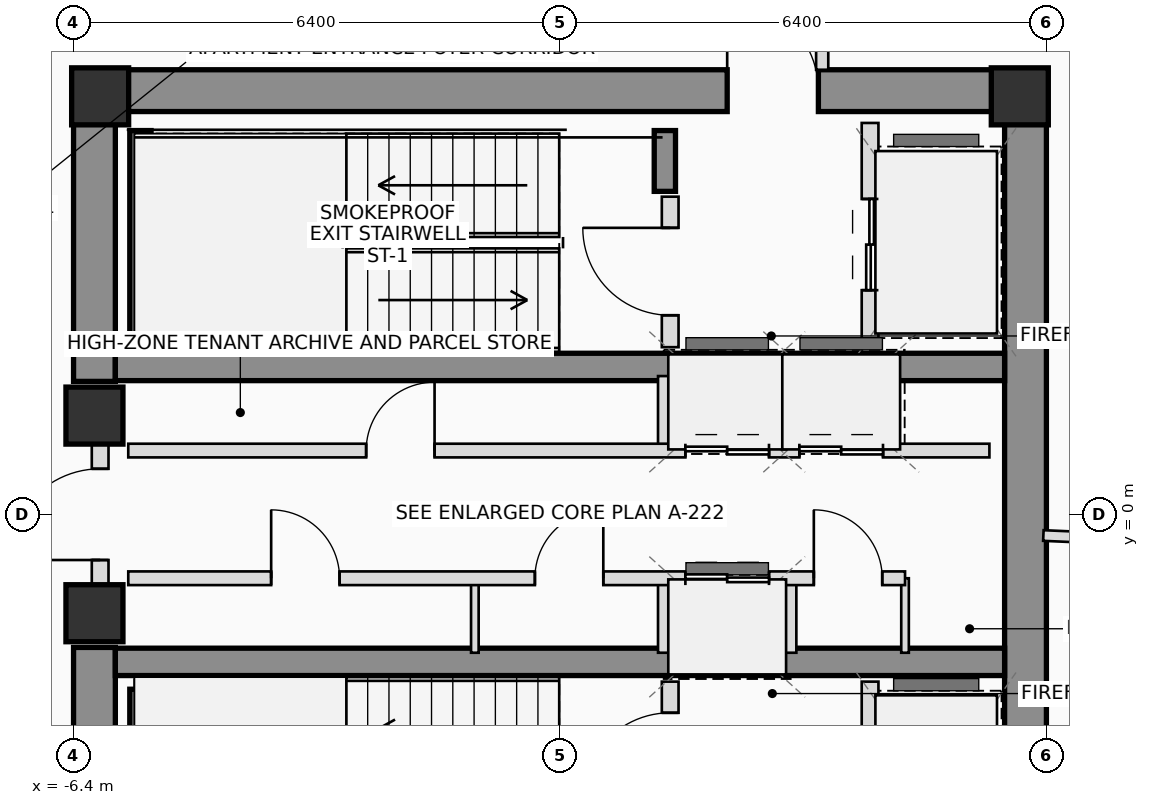
"""IFC4 building model, lengths in metres.
Left out: names, types, materials, properties, quantities, classifications, styles, units other than length and angle.
Written with IfcOpenShell. Run it as: python <this file> out.ifc"""

import sys

from ifc_helpers import new_model, si_unit, direction, frame, frame_2d, origin, origin_2d, place, context, subcontext, project, spatial, rectangle, extrude, source, transform, mapped, element, fill, save


model = new_model("IFC4")
c1 = context("Model", 3, precision=1e-05, world=origin(), true_north=direction((0.0, 1.0)))
c2 = subcontext(c1, "Body", "Model", "MODEL_VIEW")
j1 = project(units=[si_unit("LENGTHUNIT", "METRE"), si_unit("PLANEANGLEUNIT", "RADIAN")], contexts=[c1])
p1 = place(None, origin())
s1 = spatial("IfcSite", under=j1, at=p1, CompositionType="ELEMENT")
p2 = place(p1, origin())
s2 = spatial("IfcBuilding", under=s1, at=p2, CompositionType="ELEMENT")
p3 = place(p2, frame((0.0, 0.0, 228.65)))
s3 = spatial("IfcBuildingStorey", under=s2, at=p3, CompositionType="ELEMENT", Elevation=228.65)
m1 = source(origin(), c2, "Body", "SweptSolid", [
    extrude(rectangle(XDim=0.75, YDim=0.75, at=origin_2d()), origin(), (0.0, 0.0, 1.0), 3.4),
])
for number, where, z_axis, x_axis in (
    (1, (6.05, 5.5, 0.0), (0.0, 0.0, 1.0), (1.0, 0.0, 0.0)),
    (2, (-6.05, 5.5, 0.0), (0.0, 0.0, 1.0), (1.0, 0.0, 0.0)),
):
    element("IfcColumn", number, at=place(p3, frame(where, z_axis=z_axis, x_axis=x_axis)), inside=s3, PredefinedType="COLUMN", context=c2, shape_type="MappedRepresentation", body=[
        mapped(m1, transform((0.0, 0.0, 0.0), scale=1.0)),
    ])
p4 = place(p3, frame((-6.4, 5.575, 0.0), z_axis=(0.0, 0.0, 1.0), x_axis=(1.0, 0.0, 0.0)))
e3 = element("IfcWall", 3, at=p4, inside=s3, PredefinedType="SHEAR", context=c2, shape_type="SweptSolid", body=[
    extrude(rectangle(XDim=12.8, YDim=0.55, at=frame_2d((6.4, 0.0))), origin(), (0.0, 0.0, 1.0), 3.4),
])
p5 = place(p4, frame((8.6, 0.0, 0.0)))
e4 = element("IfcOpeningElement", 4, at=p5, cuts=e3, PredefinedType="OPENING", context=c2, shape_type="SweptSolid", body=[
    extrude(rectangle(XDim=1.2, YDim=2.2, at=frame_2d((0.6, 1.1))), frame((0.0, 0.285, 0.0), z_axis=(0.0, -1.0, 0.0), x_axis=(1.0, 0.0, 0.0)), (0.0, 0.0, 1.0), 0.57),
])
p6 = place(p3, frame((6.125, -5.3, 0.0), z_axis=(0.0, 0.0, 1.0), x_axis=(0.0, 1.0, 0.0)))
e5 = element("IfcWall", 5, at=p6, inside=s3, PredefinedType="SHEAR", context=c2, shape_type="SweptSolid", body=[
    extrude(rectangle(XDim=10.6, YDim=0.55, at=frame_2d((5.3, 0.0))), origin(), (0.0, 0.0, 1.0), 3.4),
])
for number, where, z_axis, x_axis in (
    (6, (-6.125, -5.3, 0.0), (0.0, 0.0, 1.0), (0.0, 1.0, 0.0)),
    (7, (-6.125, 1.75, 0.0), (0.0, 0.0, 1.0), (0.0, 1.0, 0.0)),
):
    element("IfcWall", number, at=place(p3, frame(where, z_axis=z_axis, x_axis=x_axis)), inside=s3, PredefinedType="SHEAR", context=c2, shape_type="SweptSolid", body=[
        extrude(rectangle(XDim=3.55, YDim=0.55, at=frame_2d((1.775, 0.0))), origin(), (0.0, 0.0, 1.0), 3.4),
    ])
for number, where, z_axis, x_axis in (
    (8, (-5.85, 1.94, 0.0), (0.0, 0.0, 1.0), (1.0, 0.0, 0.0)),
    (9, (-5.85, -1.94, 0.0), (0.0, 0.0, 1.0), (1.0, 0.0, 0.0)),
):
    element("IfcWall", number, at=place(p3, frame(where, z_axis=z_axis, x_axis=x_axis)), inside=s3, PredefinedType="SHEAR", context=c2, shape_type="SweptSolid", body=[
        extrude(rectangle(XDim=11.7, YDim=0.36, at=frame_2d((5.85, 0.0))), origin(), (0.0, 0.0, 1.0), 3.4),
    ])
p7 = place(p3, frame((-5.52, 2.3, 0.0), z_axis=(0.0, 0.0, 1.0), x_axis=(0.0, 1.0, 0.0)))
e10 = element("IfcWall", 10, at=p7, inside=s3, PredefinedType="SHEAR", context=c2, shape_type="SweptSolid", body=[
    extrude(rectangle(XDim=2.75, YDim=0.28, at=frame_2d((1.375, 0.0))), origin(), (0.0, 0.0, 1.0), 3.4),
])
p8 = place(p3, frame((1.38, 4.25, 0.0), z_axis=(0.0, 0.0, 1.0), x_axis=(0.0, 1.0, 0.0)))
e11 = element("IfcWall", 11, at=p8, inside=s3, PredefinedType="SHEAR", context=c2, shape_type="SweptSolid", body=[
    extrude(rectangle(XDim=0.8, YDim=0.28, at=frame_2d((0.4, 0.0))), origin(), (0.0, 0.0, 1.0), 3.4),
])
p9 = place(p3, frame((-5.52, -5.05, 0.0), z_axis=(0.0, 0.0, 1.0), x_axis=(0.0, 1.0, 0.0)))
e12 = element("IfcWall", 12, at=p9, inside=s3, PredefinedType="SHEAR", context=c2, shape_type="SweptSolid", body=[
    extrude(rectangle(XDim=2.75, YDim=0.28, at=frame_2d((1.375, 0.0))), origin(), (0.0, 0.0, 1.0), 3.4),
])
for number, where, z_axis, x_axis in (
    (13, (-6.125, -1.3, 0.0), (0.0, 0.0, 1.0), (1.0, 0.0, 0.0)),
    (14, (-6.125, 1.3, 0.0), (0.0, 0.0, 1.0), (1.0, 0.0, 0.0)),
):
    element("IfcColumn", number, at=place(p3, frame(where, z_axis=z_axis, x_axis=x_axis)), inside=s3, PredefinedType="COLUMN", context=c2, shape_type="MappedRepresentation", body=[
        mapped(m1, transform((0.0, 0.0, 0.0), scale=1.0)),
    ])
p10 = place(p3, frame((-6.05, -0.95, 0.0), z_axis=(0.0, 0.0, 1.0), x_axis=(0.0, 1.0, 0.0)))
e15 = element("IfcWall", 15, at=p10, inside=s3, PredefinedType="PLUMBINGWALL", context=c2, shape_type="SweptSolid", body=[
    extrude(rectangle(XDim=1.9, YDim=0.22, at=frame_2d((0.95, 0.0))), origin(), (0.0, 0.0, 1.0), 2.18),
])
p11 = place(p10, frame((0.35, 0.0, 0.0)))
e16 = element("IfcOpeningElement", 16, at=p11, cuts=e15, PredefinedType="OPENING", context=c2, shape_type="SweptSolid", body=[
    extrude(rectangle(XDim=1.2, YDim=2.2, at=frame_2d((0.6, 1.1))), frame((0.0, 0.12, 0.0), z_axis=(0.0, -1.0, 0.0), x_axis=(1.0, 0.0, 0.0)), (0.0, 0.0, 1.0), 0.24),
])
p12 = place(p3, frame((1.45, 2.2, 0.0), z_axis=(0.0, 0.0, 1.0), x_axis=(0.0, 1.0, 0.0)))
e17 = element("IfcWall", 17, at=p12, inside=s3, PredefinedType="PLUMBINGWALL", context=c2, shape_type="SweptSolid", body=[
    extrude(rectangle(XDim=1.98, YDim=0.22, at=frame_2d((0.99, 0.0))), origin(), (0.0, 0.0, 1.0), 3.2),
])
p13 = place(p12, frame((0.42, 0.0, 0.0)))
e18 = element("IfcOpeningElement", 18, at=p13, cuts=e17, PredefinedType="OPENING", context=c2, shape_type="SweptSolid", body=[
    extrude(rectangle(XDim=1.15, YDim=2.15, at=frame_2d((0.575, 1.075))), frame((0.0, 0.12, 0.0), z_axis=(0.0, -1.0, 0.0), x_axis=(1.0, 0.0, 0.0)), (0.0, 0.0, 1.0), 0.24),
])
p14 = place(p3, frame((4.08, 2.2, 0.0), z_axis=(0.0, 0.0, 1.0), x_axis=(0.0, 1.0, 0.0)))
e19 = element("IfcWall", 19, at=p14, inside=s3, PredefinedType="PLUMBINGWALL", context=c2, shape_type="SweptSolid", body=[
    extrude(rectangle(XDim=2.95, YDim=0.22, at=frame_2d((1.475, 0.0))), origin(), (0.0, 0.0, 1.0), 3.2),
])
p15 = place(p14, frame((0.75, 0.0, 0.0)))
e20 = element("IfcOpeningElement", 20, at=p15, cuts=e19, PredefinedType="OPENING", context=c2, shape_type="SweptSolid", body=[
    extrude(rectangle(XDim=1.2, YDim=2.25, at=frame_2d((0.6, 1.125))), frame((0.0, 0.12, 0.0), z_axis=(0.0, -1.0, 0.0), x_axis=(1.0, 0.0, 0.0)), (0.0, 0.0, 1.0), 0.24),
])
p16 = place(p3, frame((1.45, -4.18, 0.0), z_axis=(0.0, 0.0, 1.0), x_axis=(0.0, 1.0, 0.0)))
e21 = element("IfcWall", 21, at=p16, inside=s3, PredefinedType="PLUMBINGWALL", context=c2, shape_type="SweptSolid", body=[
    extrude(rectangle(XDim=1.98, YDim=0.22, at=frame_2d((0.99, 0.0))), origin(), (0.0, 0.0, 1.0), 3.2),
])
p17 = place(p16, frame((0.42, 0.0, 0.0)))
e22 = element("IfcOpeningElement", 22, at=p17, cuts=e21, PredefinedType="OPENING", context=c2, shape_type="SweptSolid", body=[
    extrude(rectangle(XDim=1.15, YDim=2.15, at=frame_2d((0.575, 1.075))), frame((0.0, 0.12, 0.0), z_axis=(0.0, -1.0, 0.0), x_axis=(1.0, 0.0, 0.0)), (0.0, 0.0, 1.0), 0.24),
])
p18 = place(p3, frame((4.08, -5.15, 0.0), z_axis=(0.0, 0.0, 1.0), x_axis=(0.0, 1.0, 0.0)))
e23 = element("IfcWall", 23, at=p18, inside=s3, PredefinedType="PLUMBINGWALL", context=c2, shape_type="SweptSolid", body=[
    extrude(rectangle(XDim=2.95, YDim=0.22, at=frame_2d((1.475, 0.0))), origin(), (0.0, 0.0, 1.0), 3.2),
])
p19 = place(p18, frame((0.95, 0.0, 0.0)))
e24 = element("IfcOpeningElement", 24, at=p19, cuts=e23, PredefinedType="OPENING", context=c2, shape_type="SweptSolid", body=[
    extrude(rectangle(XDim=1.2, YDim=2.25, at=frame_2d((0.6, 1.125))), frame((0.0, 0.12, 0.0), z_axis=(0.0, -1.0, 0.0), x_axis=(1.0, 0.0, 0.0)), (0.0, 0.0, 1.0), 0.24),
])
p20 = place(p3, frame((-1.12, -1.82, 0.0), z_axis=(0.0, 0.0, 1.0), x_axis=(0.0, 1.0, 0.0)))
e25 = element("IfcWall", 25, at=p20, inside=s3, PredefinedType="PARTITIONING", context=c2, shape_type="SweptSolid", body=[
    extrude(rectangle(XDim=0.98, YDim=0.1, at=frame_2d((0.49, 0.0))), origin(), (0.0, 0.0, 1.0), 3.2),
])
for number, where, z_axis, x_axis in (
    (26, (1.38, 0.84, 0.0), (0.0, 0.0, 1.0), (0.0, 1.0, 0.0)),
    (27, (1.38, -1.82, 0.0), (0.0, 0.0, 1.0), (0.0, 1.0, 0.0)),
    (28, (3.02, 0.84, 0.0), (0.0, 0.0, 1.0), (0.0, 1.0, 0.0)),
    (29, (4.38, 0.84, 0.0), (0.0, 0.0, 1.0), (0.0, 1.0, 0.0)),
    (30, (3.02, -1.82, 0.0), (0.0, 0.0, 1.0), (0.0, 1.0, 0.0)),
):
    element("IfcWall", number, at=place(p3, frame(where, z_axis=z_axis, x_axis=x_axis)), inside=s3, PredefinedType="PLUMBINGWALL", context=c2, shape_type="SweptSolid", body=[
        extrude(rectangle(XDim=0.98, YDim=0.18, at=frame_2d((0.49, 0.0))), origin(), (0.0, 0.0, 1.0), 3.2),
    ])
p21 = place(p3, frame((4.54, -1.82, 0.0), z_axis=(0.0, 0.0, 1.0), x_axis=(0.0, 1.0, 0.0)))
e31 = element("IfcWall", 31, at=p21, inside=s3, PredefinedType="PARTITIONING", context=c2, shape_type="SweptSolid", body=[
    extrude(rectangle(XDim=0.98, YDim=0.1, at=frame_2d((0.49, 0.0))), origin(), (0.0, 0.0, 1.0), 3.2),
])
p22 = place(p3, frame((-5.68, 0.84, 0.0), z_axis=(0.0, 0.0, 1.0), x_axis=(1.0, 0.0, 0.0)))
e32 = element("IfcWall", 32, at=p22, inside=s3, PredefinedType="PLUMBINGWALL", context=c2, shape_type="SweptSolid", body=[
    extrude(rectangle(XDim=11.33, YDim=0.18, at=frame_2d((5.665, 0.0))), origin(), (0.0, 0.0, 1.0), 3.2),
])
p23 = place(p22, frame((3.13, 0.0, 0.0)))
e33 = element("IfcOpeningElement", 33, at=p23, cuts=e32, PredefinedType="OPENING", context=c2, shape_type="SweptSolid", body=[
    extrude(rectangle(XDim=0.9, YDim=2.05, at=frame_2d((0.45, 1.025))), frame((0.0, 0.1, 0.0), z_axis=(0.0, -1.0, 0.0), x_axis=(1.0, 0.0, 0.0)), (0.0, 0.0, 1.0), 0.2),
])
p24 = place(p22, frame((7.33, 0.0, 0.0)))
e34 = element("IfcOpeningElement", 34, at=p24, cuts=e32, PredefinedType="OPENING", context=c2, shape_type="SweptSolid", body=[
    extrude(rectangle(XDim=1.1, YDim=2.2, at=frame_2d((0.55, 1.1))), frame((0.0, 0.1, 0.0), z_axis=(0.0, -1.0, 0.0), x_axis=(1.0, 0.0, 0.0)), (0.0, 0.0, 1.0), 0.2),
])
p25 = place(p22, frame((8.83, 0.0, 0.0)))
e35 = element("IfcOpeningElement", 35, at=p25, cuts=e32, PredefinedType="OPENING", context=c2, shape_type="SweptSolid", body=[
    extrude(rectangle(XDim=1.1, YDim=2.2, at=frame_2d((0.55, 1.1))), frame((0.0, 0.1, 0.0), z_axis=(0.0, -1.0, 0.0), x_axis=(1.0, 0.0, 0.0)), (0.0, 0.0, 1.0), 0.2),
])
p26 = place(p3, frame((-5.68, -0.84, 0.0), z_axis=(0.0, 0.0, 1.0), x_axis=(1.0, 0.0, 0.0)))
e36 = element("IfcWall", 36, at=p26, inside=s3, PredefinedType="PLUMBINGWALL", context=c2, shape_type="SweptSolid", body=[
    extrude(rectangle(XDim=10.22, YDim=0.18, at=frame_2d((5.11, 0.0))), origin(), (0.0, 0.0, 1.0), 3.2),
])
p27 = place(p26, frame((1.88, 0.0, 0.0)))
e37 = element("IfcOpeningElement", 37, at=p27, cuts=e36, PredefinedType="OPENING", context=c2, shape_type="SweptSolid", body=[
    extrude(rectangle(XDim=0.9, YDim=2.05, at=frame_2d((0.45, 1.025))), frame((0.0, 0.1, 0.0), z_axis=(0.0, -1.0, 0.0), x_axis=(1.0, 0.0, 0.0)), (0.0, 0.0, 1.0), 0.2),
])
p28 = place(p26, frame((5.35, 0.0, 0.0)))
e38 = element("IfcOpeningElement", 38, at=p28, cuts=e36, PredefinedType="OPENING", context=c2, shape_type="SweptSolid", body=[
    extrude(rectangle(XDim=0.9, YDim=2.05, at=frame_2d((0.45, 1.025))), frame((0.0, 0.1, 0.0), z_axis=(0.0, -1.0, 0.0), x_axis=(1.0, 0.0, 0.0)), (0.0, 0.0, 1.0), 0.2),
])
p29 = place(p26, frame((7.33, 0.0, 0.0)))
e39 = element("IfcOpeningElement", 39, at=p29, cuts=e36, PredefinedType="OPENING", context=c2, shape_type="SweptSolid", body=[
    extrude(rectangle(XDim=1.1, YDim=2.2, at=frame_2d((0.55, 1.1))), frame((0.0, 0.1, 0.0), z_axis=(0.0, -1.0, 0.0), x_axis=(1.0, 0.0, 0.0)), (0.0, 0.0, 1.0), 0.2),
])
p30 = place(p26, frame((9.02, 0.0, 0.0)))
e40 = element("IfcOpeningElement", 40, at=p30, cuts=e36, PredefinedType="OPENING", context=c2, shape_type="SweptSolid", body=[
    extrude(rectangle(XDim=0.9, YDim=2.05, at=frame_2d((0.45, 1.025))), frame((0.0, 0.1, 0.0), z_axis=(0.0, -1.0, 0.0), x_axis=(1.0, 0.0, 0.0)), (0.0, 0.0, 1.0), 0.2),
])
p31 = place(p3, frame((3.45, 7.49, 0.0), z_axis=(0.0, 0.0, 1.0), x_axis=(0.0, -1.0, 0.0)))
e41 = element("IfcWall", 41, at=p31, inside=s3, PredefinedType="PARTITIONING", context=c2, shape_type="SweptSolid", body=[
    extrude(rectangle(XDim=1.64, YDim=0.16, at=frame_2d((0.82, 0.0))), origin(), (0.0, 0.0, 1.0), 3.2),
])
p32 = place(p31, frame((0.32, 0.0, 0.0)))
e42 = element("IfcOpeningElement", 42, at=p32, cuts=e41, PredefinedType="OPENING", context=c2, shape_type="SweptSolid", body=[
    extrude(rectangle(XDim=1.0, YDim=2.25, at=frame_2d((0.5, 1.125))), frame((0.0, 0.09, 0.0), z_axis=(0.0, -1.0, 0.0), x_axis=(1.0, 0.0, 0.0)), (0.0, 0.0, 1.0), 0.18),
])
p33 = place(p3, frame((6.36, -0.278, 0.0), z_axis=(0.0, 0.0, 1.0), x_axis=(0.99904773846, -0.043630451279, 0.0)))
e43 = element("IfcWall", 43, at=p33, inside=s3, PredefinedType="PARTITIONING", context=c2, shape_type="SweptSolid", body=[
    extrude(rectangle(XDim=8.992, YDim=0.14, at=frame_2d((4.496, 0.0))), origin(), (0.0, 0.0, 1.0), 2.605),
])
p34 = place(p5, origin())
e44 = element("IfcDoor", 44, at=p34, inside=s3, OperationType="SINGLE_SWING_LEFT", PredefinedType="DOOR", context=c2, shape_type="SweptSolid", body=[
    extrude(rectangle(XDim=1.2, YDim=2.2, at=frame_2d((0.6, 1.1))), frame((0.0, 0.025, 0.0), z_axis=(0.0, -1.0, 0.0), x_axis=(1.0, 0.0, 0.0)), (0.0, 0.0, 1.0), 0.05),
])
fill(e4, e44)
p35 = place(p11, origin())
e45 = element("IfcDoor", 45, at=p35, inside=s3, OperationType="SINGLE_SWING_LEFT", PredefinedType="DOOR", context=c2, shape_type="SweptSolid", body=[
    extrude(rectangle(XDim=1.2, YDim=2.2, at=frame_2d((0.6, 1.1))), frame((0.0, 0.025, 0.0), z_axis=(0.0, -1.0, 0.0), x_axis=(1.0, 0.0, 0.0)), (0.0, 0.0, 1.0), 0.05),
])
fill(e16, e45)
p36 = place(p13, origin())
e46 = element("IfcDoor", 46, at=p36, inside=s3, OperationType="SINGLE_SWING_RIGHT", PredefinedType="DOOR", context=c2, shape_type="SweptSolid", body=[
    extrude(rectangle(XDim=1.15, YDim=2.15, at=frame_2d((0.575, 1.075))), frame((0.0, 0.025, 0.0), z_axis=(0.0, -1.0, 0.0), x_axis=(1.0, 0.0, 0.0)), (0.0, 0.0, 1.0), 0.05),
])
fill(e18, e46)
p37 = place(p15, origin())
e47 = element("IfcDoor", 47, at=p37, inside=s3, OperationType="DOUBLE_DOOR_SLIDING", PredefinedType="DOOR", context=c2, shape_type="SweptSolid", body=[
    extrude(rectangle(XDim=1.2, YDim=2.25, at=frame_2d((0.6, 1.125))), frame((0.0, 0.025, 0.0), z_axis=(0.0, -1.0, 0.0), x_axis=(1.0, 0.0, 0.0)), (0.0, 0.0, 1.0), 0.05),
])
fill(e20, e47)
p38 = place(p17, origin())
e48 = element("IfcDoor", 48, at=p38, inside=s3, OperationType="SINGLE_SWING_LEFT", PredefinedType="DOOR", context=c2, shape_type="SweptSolid", body=[
    extrude(rectangle(XDim=1.15, YDim=2.15, at=frame_2d((0.575, 1.075))), frame((0.0, 0.025, 0.0), z_axis=(0.0, -1.0, 0.0), x_axis=(1.0, 0.0, 0.0)), (0.0, 0.0, 1.0), 0.05),
])
fill(e22, e48)
p39 = place(p23, origin())
e49 = element("IfcDoor", 49, at=p39, inside=s3, OperationType="SINGLE_SWING_RIGHT", PredefinedType="DOOR", context=c2, shape_type="SweptSolid", body=[
    extrude(rectangle(XDim=0.9, YDim=2.05, at=frame_2d((0.45, 1.025))), frame((0.0, 0.025, 0.0), z_axis=(0.0, -1.0, 0.0), x_axis=(1.0, 0.0, 0.0)), (0.0, 0.0, 1.0), 0.05),
])
fill(e33, e49)
p40 = place(p24, origin())
e50 = element("IfcDoor", 50, at=p40, inside=s3, OperationType="DOUBLE_DOOR_SLIDING", PredefinedType="DOOR", context=c2, shape_type="SweptSolid", body=[
    extrude(rectangle(XDim=1.1, YDim=2.2, at=frame_2d((0.55, 1.1))), frame((0.0, 0.025, 0.0), z_axis=(0.0, -1.0, 0.0), x_axis=(1.0, 0.0, 0.0)), (0.0, 0.0, 1.0), 0.05),
])
fill(e34, e50)
p41 = place(p25, origin())
e51 = element("IfcDoor", 51, at=p41, inside=s3, OperationType="DOUBLE_DOOR_SLIDING", PredefinedType="DOOR", context=c2, shape_type="SweptSolid", body=[
    extrude(rectangle(XDim=1.1, YDim=2.2, at=frame_2d((0.55, 1.1))), frame((0.0, 0.025, 0.0), z_axis=(0.0, -1.0, 0.0), x_axis=(1.0, 0.0, 0.0)), (0.0, 0.0, 1.0), 0.05),
])
fill(e35, e51)
p42 = place(p27, origin())
e52 = element("IfcDoor", 52, at=p42, inside=s3, OperationType="SINGLE_SWING_LEFT", PredefinedType="DOOR", context=c2, shape_type="SweptSolid", body=[
    extrude(rectangle(XDim=0.9, YDim=2.05, at=frame_2d((0.45, 1.025))), frame((0.0, 0.025, 0.0), z_axis=(0.0, -1.0, 0.0), x_axis=(1.0, 0.0, 0.0)), (0.0, 0.0, 1.0), 0.05),
])
fill(e37, e52)
p43 = place(p28, origin())
e53 = element("IfcDoor", 53, at=p43, inside=s3, OperationType="SINGLE_SWING_RIGHT", PredefinedType="DOOR", context=c2, shape_type="SweptSolid", body=[
    extrude(rectangle(XDim=0.9, YDim=2.05, at=frame_2d((0.45, 1.025))), frame((0.0, 0.025, 0.0), z_axis=(0.0, -1.0, 0.0), x_axis=(1.0, 0.0, 0.0)), (0.0, 0.0, 1.0), 0.05),
])
fill(e38, e53)
p44 = place(p29, origin())
e54 = element("IfcDoor", 54, at=p44, inside=s3, OperationType="DOUBLE_DOOR_SLIDING", PredefinedType="DOOR", context=c2, shape_type="SweptSolid", body=[
    extrude(rectangle(XDim=1.1, YDim=2.2, at=frame_2d((0.55, 1.1))), frame((0.0, 0.025, 0.0), z_axis=(0.0, -1.0, 0.0), x_axis=(1.0, 0.0, 0.0)), (0.0, 0.0, 1.0), 0.05),
])
fill(e39, e54)
p45 = place(p30, origin())
e55 = element("IfcDoor", 55, at=p45, inside=s3, OperationType="SINGLE_SWING_LEFT", PredefinedType="DOOR", context=c2, shape_type="SweptSolid", body=[
    extrude(rectangle(XDim=0.9, YDim=2.05, at=frame_2d((0.45, 1.025))), frame((0.0, 0.025, 0.0), z_axis=(0.0, -1.0, 0.0), x_axis=(1.0, 0.0, 0.0)), (0.0, 0.0, 1.0), 0.05),
])
fill(e40, e55)
save(model, sys.argv[1])
